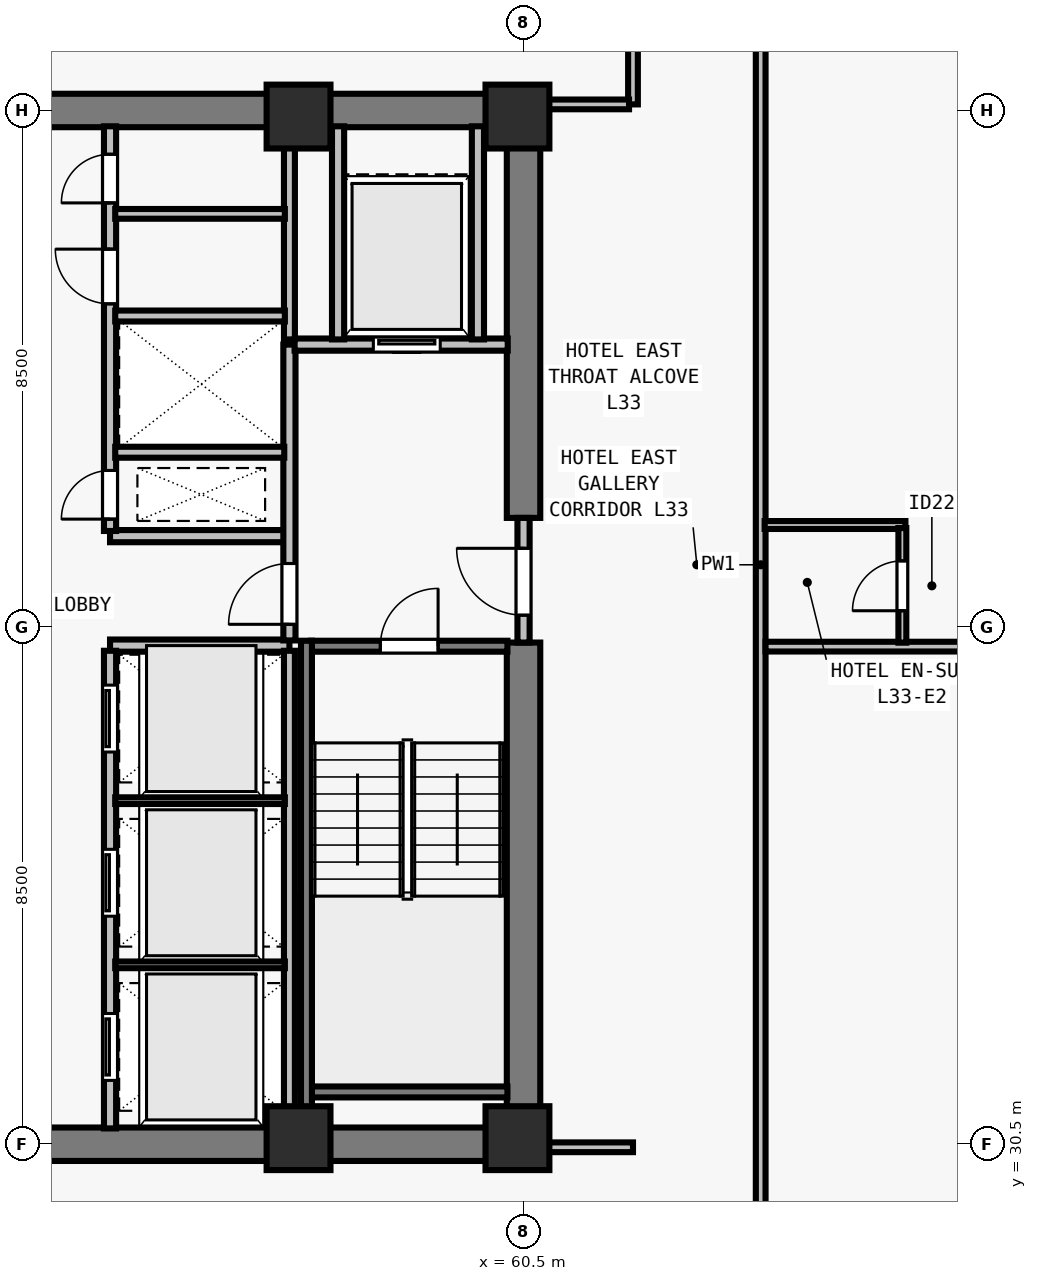
"""IFC4 building model, lengths in metres.
Left out: names, types, materials, properties, quantities, classifications, styles, units other than length and angle.
Written with IfcOpenShell. Run it as: python <this file> out.ifc"""

import sys

from ifc_helpers import new_model, si_unit, direction, frame, frame_2d, origin, origin_2d, place, context, subcontext, project, spatial, rectangle, extrude, element, fill, save


model = new_model("IFC4")
c1 = context("Model", 3, precision=1e-05, world=origin(), true_north=direction((0.0, 1.0)))
c2 = subcontext(c1, "Body", "Model", "MODEL_VIEW")
j1 = project(units=[si_unit("LENGTHUNIT", "METRE"), si_unit("PLANEANGLEUNIT", "RADIAN")], contexts=[c1])
p1 = place(None, origin())
s1 = spatial("IfcSite", under=j1, at=p1, CompositionType="ELEMENT")
p2 = place(p1, origin())
s2 = spatial("IfcBuilding", under=s1, at=p2, CompositionType="ELEMENT")
p3 = place(p2, frame((0.0, 0.0, 123.5)))
s3 = spatial("IfcBuildingStorey", under=s2, at=p3, CompositionType="ELEMENT", Elevation=123.5)
for number, where, z_axis, x_axis in (
    (1, (56.8, 30.6, 0.0), (0.0, 0.0, 1.0), (1.0, 0.0, 0.0)),
    (2, (60.4, 30.6, 0.0), (0.0, 0.0, 1.0), (1.0, 0.0, 0.0)),
    (3, (56.8, 47.4, 0.0), (0.0, 0.0, 1.0), (1.0, 0.0, 0.0)),
    (4, (60.4, 47.4, 0.0), (0.0, 0.0, 1.0), (1.0, 0.0, 0.0)),
):
    element("IfcColumn", number, at=place(p3, frame(where, z_axis=z_axis, x_axis=x_axis)), inside=s3, PredefinedType="COLUMN", context=c2, shape_type="SweptSolid", body=[
        extrude(rectangle(XDim=1.05, YDim=1.05, at=origin_2d()), origin(), (0.0, 0.0, 1.0), 3.5),
    ])
for number, where, z_axis, x_axis in (
    (5, (43.225, 30.5, 0.0), (0.0, 0.0, 1.0), (1.0, 0.0, 0.0)),
    (6, (43.225, 47.5, 0.0), (0.0, 0.0, 1.0), (1.0, 0.0, 0.0)),
):
    element("IfcWall", number, at=place(p3, frame(where, z_axis=z_axis, x_axis=x_axis)), inside=s3, PredefinedType="SHEAR", context=c2, shape_type="SweptSolid", body=[
        extrude(rectangle(XDim=17.55, YDim=0.55, at=frame_2d((8.775, 0.0))), origin(), (0.0, 0.0, 1.0), 3.28),
    ])
p4 = place(p3, frame((60.5, 30.765, 0.0), z_axis=(0.0, 0.0, 1.0), x_axis=(0.0, 1.0, 0.0)))
e7 = element("IfcWall", 7, at=p4, inside=s3, PredefinedType="SHEAR", context=c2, shape_type="SweptSolid", body=[
    extrude(rectangle(XDim=7.985, YDim=0.55, at=frame_2d((3.993, 0.0))), origin(), (0.0, 0.0, 1.0), 3.28),
])
p5 = place(p3, frame((60.5, 40.8, 0.0), z_axis=(0.0, 0.0, 1.0), x_axis=(0.0, 1.0, 0.0)))
e8 = element("IfcWall", 8, at=p5, inside=s3, PredefinedType="SHEAR", context=c2, shape_type="SweptSolid", body=[
    extrude(rectangle(XDim=6.435, YDim=0.55, at=frame_2d((3.218, 0.0))), origin(), (0.0, 0.0, 1.0), 3.28),
])
for number, where, z_axis, x_axis in (
    (9, (53.7, 38.7, 0.0), (0.0, 0.0, 1.0), (1.0, 0.0, 0.0)),
    (10, (53.7, 40.5, 0.0), (0.0, 0.0, 1.0), (1.0, 0.0, 0.0)),
):
    element("IfcWall", number, at=place(p3, frame(where, z_axis=z_axis, x_axis=x_axis)), inside=s3, PredefinedType="SOLIDWALL", context=c2, shape_type="SweptSolid", body=[
        extrude(rectangle(XDim=2.95, YDim=0.2, at=frame_2d((1.475, 0.0))), origin(), (0.0, 0.0, 1.0), 3.28),
    ])
p6 = place(p3, frame((53.7, 30.76, 0.0), z_axis=(0.0, 0.0, 1.0), x_axis=(0.0, 1.0, 0.0)))
e11 = element("IfcWall", 11, at=p6, inside=s3, PredefinedType="SOLIDWALL", context=c2, shape_type="SweptSolid", body=[
    extrude(rectangle(XDim=7.855, YDim=0.2, at=frame_2d((3.927, 0.0))), origin(), (0.0, 0.0, 1.0), 3.28),
])
p7 = place(p6, frame((0.79, 0.0, 0.0)))
e12 = element("IfcOpeningElement", 12, at=p7, cuts=e11, PredefinedType="OPENING", context=c2, shape_type="SweptSolid", body=[
    extrude(rectangle(XDim=1.1, YDim=2.2, at=frame_2d((0.55, 1.1))), frame((0.0, 0.11, 0.0), z_axis=(0.0, -1.0, 0.0), x_axis=(1.0, 0.0, 0.0)), (0.0, 0.0, 1.0), 0.22),
])
p8 = place(p6, frame((3.49, 0.0, 0.0)))
e13 = element("IfcOpeningElement", 13, at=p8, cuts=e11, PredefinedType="OPENING", context=c2, shape_type="SweptSolid", body=[
    extrude(rectangle(XDim=1.1, YDim=2.2, at=frame_2d((0.55, 1.1))), frame((0.0, 0.11, 0.0), z_axis=(0.0, -1.0, 0.0), x_axis=(1.0, 0.0, 0.0)), (0.0, 0.0, 1.0), 0.22),
])
p9 = place(p6, frame((6.19, 0.0, 0.0)))
e14 = element("IfcOpeningElement", 14, at=p9, cuts=e11, PredefinedType="OPENING", context=c2, shape_type="SweptSolid", body=[
    extrude(rectangle(XDim=1.1, YDim=2.2, at=frame_2d((0.55, 1.1))), frame((0.0, 0.11, 0.0), z_axis=(0.0, -1.0, 0.0), x_axis=(1.0, 0.0, 0.0)), (0.0, 0.0, 1.0), 0.22),
])
p10 = place(p3, frame((53.7, 40.585, 0.0), z_axis=(0.0, 0.0, 1.0), x_axis=(0.0, 1.0, 0.0)))
e15 = element("IfcWall", 15, at=p10, inside=s3, PredefinedType="SOLIDWALL", context=c2, shape_type="SweptSolid", body=[
    extrude(rectangle(XDim=6.655, YDim=0.2, at=frame_2d((3.328, 0.0))), origin(), (0.0, 0.0, 1.0), 3.28),
])
p11 = place(p10, frame((0.195, 0.0, 0.0)))
e16 = element("IfcOpeningElement", 16, at=p11, cuts=e15, PredefinedType="OPENING", context=c2, shape_type="SweptSolid", body=[
    extrude(rectangle(XDim=0.8, YDim=2.08, at=frame_2d((0.4, 1.04))), frame((0.0, 0.11, 0.0), z_axis=(0.0, -1.0, 0.0), x_axis=(1.0, 0.0, 0.0)), (0.0, 0.0, 1.0), 0.22),
])
p12 = place(p10, frame((3.735, 0.0, 0.0)))
e17 = element("IfcOpeningElement", 17, at=p12, cuts=e15, PredefinedType="OPENING", context=c2, shape_type="SweptSolid", body=[
    extrude(rectangle(XDim=0.9, YDim=2.12, at=frame_2d((0.45, 1.06))), frame((0.0, 0.11, 0.0), z_axis=(0.0, -1.0, 0.0), x_axis=(1.0, 0.0, 0.0)), (0.0, 0.0, 1.0), 0.22),
])
p13 = place(p10, frame((5.395, 0.0, 0.0)))
e18 = element("IfcOpeningElement", 18, at=p13, cuts=e15, PredefinedType="OPENING", context=c2, shape_type="SweptSolid", body=[
    extrude(rectangle(XDim=0.8, YDim=2.1, at=frame_2d((0.4, 1.05))), frame((0.0, 0.11, 0.0), z_axis=(0.0, -1.0, 0.0), x_axis=(1.0, 0.0, 0.0)), (0.0, 0.0, 1.0), 0.22),
])
p14 = place(p3, frame((60.5, 38.75, 0.0), z_axis=(0.0, 0.0, 1.0), x_axis=(0.0, 1.0, 0.0)))
e19 = element("IfcWall", 19, at=p14, inside=s3, PredefinedType="SOLIDWALL", context=c2, shape_type="SweptSolid", body=[
    extrude(rectangle(XDim=2.05, YDim=0.2, at=frame_2d((1.025, 0.0))), origin(), (0.0, 0.0, 1.0), 3.28),
])
p15 = place(p14, frame((0.45, 0.0, 0.0)))
e20 = element("IfcOpeningElement", 20, at=p15, cuts=e19, PredefinedType="OPENING", context=c2, shape_type="SweptSolid", body=[
    extrude(rectangle(XDim=1.1, YDim=2.15, at=frame_2d((0.55, 1.075))), frame((0.0, 0.11, 0.0), z_axis=(0.0, -1.0, 0.0), x_axis=(1.0, 0.0, 0.0)), (0.0, 0.0, 1.0), 0.22),
])
p16 = place(p3, frame((56.65, 38.785, 0.0), z_axis=(0.0, 0.0, 1.0), x_axis=(0.0, 1.0, 0.0)))
e21 = element("IfcWall", 21, at=p16, inside=s3, PredefinedType="SOLIDWALL", context=c2, shape_type="SweptSolid", body=[
    extrude(rectangle(XDim=4.865, YDim=0.2, at=frame_2d((2.433, 0.0))), origin(), (0.0, 0.0, 1.0), 3.28),
])
p17 = place(p16, frame((0.265, 0.0, 0.0)))
e22 = element("IfcOpeningElement", 22, at=p17, cuts=e21, PredefinedType="OPENING", context=c2, shape_type="SweptSolid", body=[
    extrude(rectangle(XDim=1.0, YDim=2.15, at=frame_2d((0.5, 1.075))), frame((0.0, 0.11, 0.0), z_axis=(0.0, -1.0, 0.0), x_axis=(1.0, 0.0, 0.0)), (0.0, 0.0, 1.0), 0.22),
])
p18 = place(p3, frame((56.735, 43.65, 0.0), z_axis=(0.0, 0.0, 1.0), x_axis=(1.0, 0.0, 0.0)))
e23 = element("IfcWall", 23, at=p18, inside=s3, PredefinedType="SOLIDWALL", context=c2, shape_type="SweptSolid", body=[
    extrude(rectangle(XDim=3.505, YDim=0.2, at=frame_2d((1.752, 0.0))), origin(), (0.0, 0.0, 1.0), 3.28),
])
p19 = place(p18, frame((1.295, 0.0, 0.0)))
e24 = element("IfcOpeningElement", 24, at=p19, cuts=e23, PredefinedType="OPENING", context=c2, shape_type="SweptSolid", body=[
    extrude(rectangle(XDim=1.1, YDim=2.2, at=frame_2d((0.55, 1.1))), frame((0.0, 0.11, 0.0), z_axis=(0.0, -1.0, 0.0), x_axis=(1.0, 0.0, 0.0)), (0.0, 0.0, 1.0), 0.22),
])
for number, where, z_axis, x_axis in (
    (25, (57.45, 43.735, 0.0), (0.0, 0.0, 1.0), (0.0, 1.0, 0.0)),
    (26, (59.75, 43.735, 0.0), (0.0, 0.0, 1.0), (0.0, 1.0, 0.0)),
):
    element("IfcWall", number, at=place(p3, frame(where, z_axis=z_axis, x_axis=x_axis)), inside=s3, PredefinedType="SOLIDWALL", context=c2, shape_type="SweptSolid", body=[
        extrude(rectangle(XDim=3.505, YDim=0.2, at=frame_2d((1.752, 0.0))), origin(), (0.0, 0.0, 1.0), 3.28),
    ])
p20 = place(p3, frame((56.65, 30.76, 0.0), z_axis=(0.0, 0.0, 1.0), x_axis=(0.0, 1.0, 0.0)))
e27 = element("IfcWall", 27, at=p20, inside=s3, PredefinedType="SOLIDWALL", context=c2, shape_type="SweptSolid", body=[
    extrude(rectangle(XDim=7.855, YDim=0.18, at=frame_2d((3.927, 0.0))), origin(), (0.0, 0.0, 1.0), 3.28),
])
for number, where, z_axis, x_axis in (
    (28, (53.785, 33.45, 0.0), (0.0, 0.0, 1.0), (1.0, 0.0, 0.0)),
    (29, (53.785, 36.15, 0.0), (0.0, 0.0, 1.0), (1.0, 0.0, 0.0)),
):
    element("IfcWall", number, at=place(p3, frame(where, z_axis=z_axis, x_axis=x_axis)), inside=s3, PredefinedType="PARTITIONING", context=c2, shape_type="SweptSolid", body=[
        extrude(rectangle(XDim=2.79, YDim=0.11, at=frame_2d((1.395, 0.0))), origin(), (0.0, 0.0, 1.0), 3.28),
    ])
p21 = place(p3, frame((56.65, 43.735, 0.0), z_axis=(0.0, 0.0, 1.0), x_axis=(0.0, 1.0, 0.0)))
e30 = element("IfcWall", 30, at=p21, inside=s3, PredefinedType="SOLIDWALL", context=c2, shape_type="SweptSolid", body=[
    extrude(rectangle(XDim=3.505, YDim=0.18, at=frame_2d((1.752, 0.0))), origin(), (0.0, 0.0, 1.0), 3.28),
])
p22 = place(p3, frame((53.785, 41.88, 0.0), z_axis=(0.0, 0.0, 1.0), x_axis=(1.0, 0.0, 0.0)))
e31 = element("IfcWall", 31, at=p22, inside=s3, PredefinedType="SOLIDWALL", context=c2, shape_type="SweptSolid", body=[
    extrude(rectangle(XDim=2.78, YDim=0.18, at=frame_2d((1.39, 0.0))), origin(), (0.0, 0.0, 1.0), 3.28),
])
p23 = place(p3, frame((53.785, 44.12, 0.0), z_axis=(0.0, 0.0, 1.0), x_axis=(1.0, 0.0, 0.0)))
e32 = element("IfcWall", 32, at=p23, inside=s3, PredefinedType="SOLIDWALL", context=c2, shape_type="SweptSolid", body=[
    extrude(rectangle(XDim=2.79, YDim=0.18, at=frame_2d((1.395, 0.0))), origin(), (0.0, 0.0, 1.0), 3.28),
])
p24 = place(p3, frame((53.785, 45.8, 0.0), z_axis=(0.0, 0.0, 1.0), x_axis=(1.0, 0.0, 0.0)))
e33 = element("IfcWall", 33, at=p24, inside=s3, PredefinedType="PARTITIONING", context=c2, shape_type="SweptSolid", body=[
    extrude(rectangle(XDim=2.79, YDim=0.16, at=frame_2d((1.395, 0.0))), origin(), (0.0, 0.0, 1.0), 3.28),
])
p25 = place(p3, frame((64.4, 15.325, 0.0), z_axis=(0.0, 0.0, 1.0), x_axis=(0.0, 1.0, 0.0)))
e34 = element("IfcWall", 34, at=p25, inside=s3, PredefinedType="PARTITIONING", context=c2, shape_type="SweptSolid", body=[
    extrude(rectangle(XDim=47.35, YDim=0.16, at=frame_2d((23.675, 0.0))), origin(), (0.0, 0.0, 1.0), 2.555),
])
p26 = place(p25, frame((12.547, 0.0, 0.0)))
e35 = element("IfcOpeningElement", 35, at=p26, cuts=e34, PredefinedType="OPENING", context=c2, shape_type="SweptSolid", body=[
    extrude(rectangle(XDim=0.96, YDim=2.15, at=frame_2d((0.48, 1.075))), frame((0.0, 0.09, 0.0), z_axis=(0.0, -1.0, 0.0), x_axis=(1.0, 0.0, 0.0)), (0.0, 0.0, 1.0), 0.18),
])
p27 = place(p25, frame((35.902, 0.0, 0.0)))
e36 = element("IfcOpeningElement", 36, at=p27, cuts=e34, PredefinedType="OPENING", context=c2, shape_type="SweptSolid", body=[
    extrude(rectangle(XDim=0.96, YDim=2.15, at=frame_2d((0.48, 1.075))), frame((0.0, 0.09, 0.0), z_axis=(0.0, -1.0, 0.0), x_axis=(1.0, 0.0, 0.0)), (0.0, 0.0, 1.0), 0.18),
])
p28 = place(p3, frame((62.3, 47.6, 0.0), z_axis=(0.0, 0.0, 1.0), x_axis=(0.0, 1.0, 0.0)))
e37 = element("IfcWall", 37, at=p28, inside=s3, PredefinedType="PARTITIONING", context=c2, shape_type="SweptSolid", body=[
    extrude(rectangle(XDim=15.075, YDim=0.16, at=frame_2d((7.538, 0.0))), origin(), (0.0, 0.0, 1.0), 2.555),
])
p29 = place(p3, frame((60.765, 30.45, 0.0), z_axis=(0.0, 0.0, 1.0), x_axis=(1.0, 0.0, 0.0)))
e38 = element("IfcWall", 38, at=p29, inside=s3, PredefinedType="PARTITIONING", context=c2, shape_type="SweptSolid", body=[
    extrude(rectangle(XDim=1.535, YDim=0.16, at=frame_2d((0.768, 0.0))), origin(), (0.0, 0.0, 1.0), 3.28),
])
p30 = place(p3, frame((60.765, 47.6, 0.0), z_axis=(0.0, 0.0, 1.0), x_axis=(1.0, 0.0, 0.0)))
e39 = element("IfcWall", 39, at=p30, inside=s3, PredefinedType="PARTITIONING", context=c2, shape_type="SweptSolid", body=[
    extrude(rectangle(XDim=1.47, YDim=0.16, at=frame_2d((0.735, 0.0))), origin(), (0.0, 0.0, 1.0), 3.28),
])
p31 = place(p3, frame((64.48, 38.683, 0.0), z_axis=(0.0, 0.0, 1.0), x_axis=(1.0, 0.0, 0.0)))
e40 = element("IfcWall", 40, at=p31, inside=s3, PredefinedType="PARTITIONING", context=c2, shape_type="SweptSolid", body=[
    extrude(rectangle(XDim=11.195, YDim=0.16, at=frame_2d((5.598, 0.0))), origin(), (0.0, 0.0, 1.0), 3.28),
])
p32 = place(p3, frame((64.465, 40.683, 0.0), z_axis=(0.0, 0.0, 1.0), x_axis=(1.0, 0.0, 0.0)))
e41 = element("IfcWall", 41, at=p32, inside=s3, PredefinedType="PLUMBINGWALL", context=c2, shape_type="SweptSolid", body=[
    extrude(rectangle(XDim=2.315, YDim=0.13, at=frame_2d((1.157, 0.0))), origin(), (0.0, 0.0, 1.0), 3.28),
])
p33 = place(p3, frame((66.73, 38.748, 0.0), z_axis=(0.0, 0.0, 1.0), x_axis=(0.0, 1.0, 0.0)))
e42 = element("IfcWall", 42, at=p33, inside=s3, PredefinedType="PLUMBINGWALL", context=c2, shape_type="SweptSolid", body=[
    extrude(rectangle(XDim=1.885, YDim=0.13, at=frame_2d((0.942, 0.0))), origin(), (0.0, 0.0, 1.0), 3.28),
])
p34 = place(p33, frame((0.525, 0.0, 0.0)))
e43 = element("IfcOpeningElement", 43, at=p34, cuts=e42, PredefinedType="OPENING", context=c2, shape_type="SweptSolid", body=[
    extrude(rectangle(XDim=0.82, YDim=2.1, at=frame_2d((0.41, 1.05))), frame((0.0, 0.075, 0.0), z_axis=(0.0, -1.0, 0.0), x_axis=(1.0, 0.0, 0.0)), (0.0, 0.0, 1.0), 0.15),
])
p35 = place(p3, frame((57.005, 38.69, 0.0), z_axis=(0.0, 0.0, 1.0), x_axis=(1.0, 0.0, 0.0)))
e44 = element("IfcWall", 44, at=p35, inside=s3, PredefinedType="SOLIDWALL", context=c2, shape_type="SweptSolid", body=[
    extrude(rectangle(XDim=3.23, YDim=0.18, at=frame_2d((1.615, 0.0))), origin(), (0.0, 0.0, 1.0), 3.28),
])
p36 = place(p35, frame((1.14, 0.0, 0.0)))
e45 = element("IfcOpeningElement", 45, at=p36, cuts=e44, PredefinedType="OPENING", context=c2, shape_type="SweptSolid", body=[
    extrude(rectangle(XDim=0.95, YDim=2.15, at=frame_2d((0.475, 1.075))), frame((0.0, 0.1, 0.0), z_axis=(0.0, -1.0, 0.0), x_axis=(1.0, 0.0, 0.0)), (0.0, 0.0, 1.0), 0.2),
])
p37 = place(p3, frame((57.005, 31.36, 0.0), z_axis=(0.0, 0.0, 1.0), x_axis=(1.0, 0.0, 0.0)))
e46 = element("IfcWall", 46, at=p37, inside=s3, PredefinedType="SOLIDWALL", context=c2, shape_type="SweptSolid", body=[
    extrude(rectangle(XDim=3.23, YDim=0.18, at=frame_2d((1.615, 0.0))), origin(), (0.0, 0.0, 1.0), 3.28),
])
p38 = place(p3, frame((56.93, 38.78, 0.0), z_axis=(0.0, 0.0, 1.0), x_axis=(0.0, -1.0, 0.0)))
e47 = element("IfcWall", 47, at=p38, inside=s3, PredefinedType="SOLIDWALL", context=c2, shape_type="SweptSolid", body=[
    extrude(rectangle(XDim=8.017, YDim=0.18, at=frame_2d((4.009, 0.0))), origin(), (0.0, 0.0, 1.0), 3.28),
])
p39 = place(p15, origin())
e48 = element("IfcDoor", 48, at=p39, inside=s3, OperationType="SINGLE_SWING_RIGHT", PredefinedType="DOOR", context=c2, shape_type="SweptSolid", body=[
    extrude(rectangle(XDim=1.1, YDim=2.15, at=frame_2d((0.55, 1.075))), frame((0.0, 0.025, 0.0), z_axis=(0.0, -1.0, 0.0), x_axis=(1.0, 0.0, 0.0)), (0.0, 0.0, 1.0), 0.05),
])
fill(e20, e48)
p40 = place(p17, origin())
e49 = element("IfcDoor", 49, at=p40, inside=s3, OperationType="SINGLE_SWING_LEFT", PredefinedType="DOOR", context=c2, shape_type="SweptSolid", body=[
    extrude(rectangle(XDim=1.0, YDim=2.15, at=frame_2d((0.5, 1.075))), frame((0.0, 0.025, 0.0), z_axis=(0.0, -1.0, 0.0), x_axis=(1.0, 0.0, 0.0)), (0.0, 0.0, 1.0), 0.05),
])
fill(e22, e49)
p41 = place(p19, origin())
e50 = element("IfcDoor", 50, at=p41, inside=s3, OperationType="SLIDING_TO_LEFT", PredefinedType="DOOR", context=c2, shape_type="SweptSolid", body=[
    extrude(rectangle(XDim=1.1, YDim=2.2, at=frame_2d((0.55, 1.1))), frame((0.0, 0.025, 0.0), z_axis=(0.0, -1.0, 0.0), x_axis=(1.0, 0.0, 0.0)), (0.0, 0.0, 1.0), 0.05),
])
fill(e24, e50)
p42 = place(p7, origin())
e51 = element("IfcDoor", 51, at=p42, inside=s3, OperationType="SLIDING_TO_LEFT", PredefinedType="DOOR", context=c2, shape_type="SweptSolid", body=[
    extrude(rectangle(XDim=1.1, YDim=2.2, at=frame_2d((0.55, 1.1))), frame((0.0, 0.025, 0.0), z_axis=(0.0, -1.0, 0.0), x_axis=(1.0, 0.0, 0.0)), (0.0, 0.0, 1.0), 0.05),
])
fill(e12, e51)
p43 = place(p8, origin())
e52 = element("IfcDoor", 52, at=p43, inside=s3, OperationType="SLIDING_TO_LEFT", PredefinedType="DOOR", context=c2, shape_type="SweptSolid", body=[
    extrude(rectangle(XDim=1.1, YDim=2.2, at=frame_2d((0.55, 1.1))), frame((0.0, 0.025, 0.0), z_axis=(0.0, -1.0, 0.0), x_axis=(1.0, 0.0, 0.0)), (0.0, 0.0, 1.0), 0.05),
])
fill(e13, e52)
p44 = place(p9, origin())
e53 = element("IfcDoor", 53, at=p44, inside=s3, OperationType="SLIDING_TO_LEFT", PredefinedType="DOOR", context=c2, shape_type="SweptSolid", body=[
    extrude(rectangle(XDim=1.1, YDim=2.2, at=frame_2d((0.55, 1.1))), frame((0.0, 0.025, 0.0), z_axis=(0.0, -1.0, 0.0), x_axis=(1.0, 0.0, 0.0)), (0.0, 0.0, 1.0), 0.05),
])
fill(e14, e53)
p45 = place(p11, origin())
e54 = element("IfcDoor", 54, at=p45, inside=s3, OperationType="SINGLE_SWING_LEFT", PredefinedType="DOOR", context=c2, shape_type="SweptSolid", body=[
    extrude(rectangle(XDim=0.8, YDim=2.08, at=frame_2d((0.4, 1.04))), frame((0.0, 0.025, 0.0), z_axis=(0.0, -1.0, 0.0), x_axis=(1.0, 0.0, 0.0)), (0.0, 0.0, 1.0), 0.05),
])
fill(e16, e54)
p46 = place(p12, origin())
e55 = element("IfcDoor", 55, at=p46, inside=s3, OperationType="SINGLE_SWING_RIGHT", PredefinedType="DOOR", context=c2, shape_type="SweptSolid", body=[
    extrude(rectangle(XDim=0.9, YDim=2.12, at=frame_2d((0.45, 1.06))), frame((0.0, 0.025, 0.0), z_axis=(0.0, -1.0, 0.0), x_axis=(1.0, 0.0, 0.0)), (0.0, 0.0, 1.0), 0.05),
])
fill(e17, e55)
p47 = place(p13, origin())
e56 = element("IfcDoor", 56, at=p47, inside=s3, OperationType="SINGLE_SWING_LEFT", PredefinedType="DOOR", context=c2, shape_type="SweptSolid", body=[
    extrude(rectangle(XDim=0.8, YDim=2.1, at=frame_2d((0.4, 1.05))), frame((0.0, 0.025, 0.0), z_axis=(0.0, -1.0, 0.0), x_axis=(1.0, 0.0, 0.0)), (0.0, 0.0, 1.0), 0.05),
])
fill(e18, e56)
p48 = place(p34, origin())
e57 = element("IfcDoor", 57, at=p48, inside=s3, OperationType="SINGLE_SWING_LEFT", PredefinedType="DOOR", context=c2, shape_type="SweptSolid", body=[
    extrude(rectangle(XDim=0.82, YDim=2.1, at=frame_2d((0.41, 1.05))), frame((0.0, 0.025, 0.0), z_axis=(0.0, -1.0, 0.0), x_axis=(1.0, 0.0, 0.0)), (0.0, 0.0, 1.0), 0.05),
])
fill(e43, e57)
p49 = place(p36, origin())
e58 = element("IfcDoor", 58, at=p49, inside=s3, OperationType="SINGLE_SWING_RIGHT", PredefinedType="DOOR", context=c2, shape_type="SweptSolid", body=[
    extrude(rectangle(XDim=0.95, YDim=2.15, at=frame_2d((0.475, 1.075))), frame((0.0, 0.025, 0.0), z_axis=(0.0, -1.0, 0.0), x_axis=(1.0, 0.0, 0.0)), (0.0, 0.0, 1.0), 0.05),
])
fill(e45, e58)
save(model, sys.argv[1])
